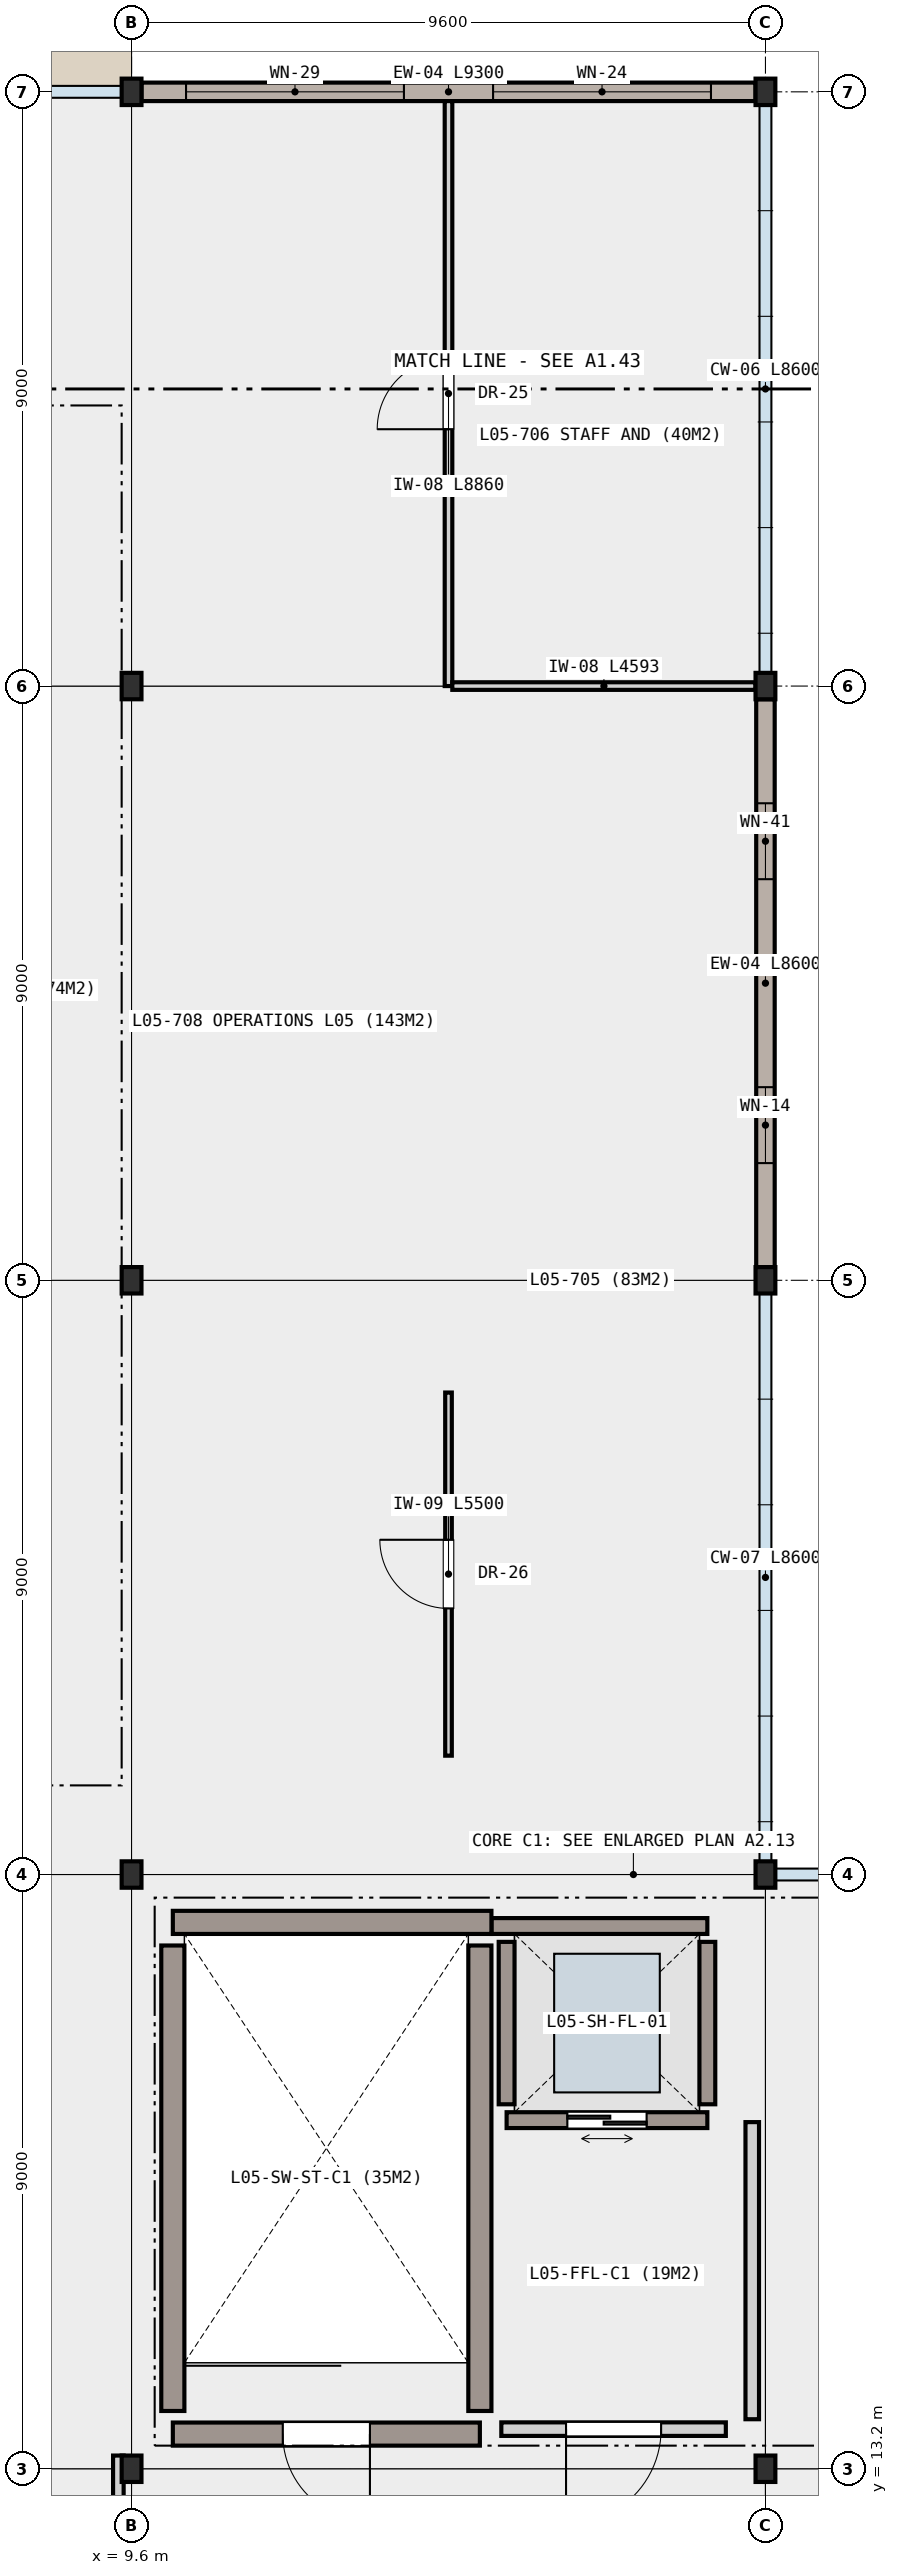
"""IFC4 building model, lengths in metres.
Left out: names, types, materials, properties, quantities, classifications, styles, units other than length and angle.
Written with IfcOpenShell. Run it as: python <this file> out.ifc"""

import sys

from ifc_helpers import new_model, si_unit, direction, frame, frame_2d, origin, origin_2d, place, context, subcontext, project, spatial, rectangle, i_section, extrude, element, fill, save


model = new_model("IFC4")
c1 = context("Model", 3, precision=1e-05, world=origin(), true_north=direction((0.0, 1.0)))
c2 = subcontext(c1, "Body", "Model", "MODEL_VIEW")
j1 = project(units=[si_unit("LENGTHUNIT", "METRE"), si_unit("PLANEANGLEUNIT", "RADIAN")], contexts=[c1])
p1 = place(None, origin())
s1 = spatial("IfcSite", under=j1, at=p1, CompositionType="ELEMENT")
p2 = place(p1, origin())
s2 = spatial("IfcBuilding", under=s1, at=p2, CompositionType="ELEMENT")
p3 = place(p2, frame((0.0, 0.0, 22.8)))
s3 = spatial("IfcBuildingStorey", under=s2, at=p3, CompositionType="ELEMENT", Elevation=22.8)
for number, where, z_axis, x_axis in (
    (1, (9.6, 13.2, 0.0), (0.0, 0.0, 1.0), (1.0, 0.0, 0.0)),
    (2, (9.6, 22.2, 0.0), (0.0, 0.0, 1.0), (1.0, 0.0, 0.0)),
    (3, (9.6, 31.2, 0.0), (0.0, 0.0, 1.0), (1.0, 0.0, 0.0)),
    (4, (9.6, 40.2, 0.0), (0.0, 0.0, 1.0), (1.0, 0.0, 0.0)),
    (5, (9.6, 49.2, 0.0), (0.0, 0.0, 1.0), (1.0, 0.0, 0.0)),
    (6, (19.2, 13.2, 0.0), (0.0, 0.0, 1.0), (1.0, 0.0, 0.0)),
    (7, (19.2, 22.2, 0.0), (0.0, 0.0, 1.0), (1.0, 0.0, 0.0)),
    (8, (19.2, 31.2, 0.0), (0.0, 0.0, 1.0), (1.0, 0.0, 0.0)),
    (9, (19.2, 40.2, 0.0), (0.0, 0.0, 1.0), (1.0, 0.0, 0.0)),
    (10, (19.2, 49.2, 0.0), (0.0, 0.0, 1.0), (1.0, 0.0, 0.0)),
):
    element("IfcColumn", number, at=place(p3, frame(where, z_axis=z_axis, x_axis=x_axis)), inside=s3, PredefinedType="COLUMN", context=c2, shape_type="SweptSolid", body=[
        extrude(i_section(OverallWidth=0.3, OverallDepth=0.4, WebThickness=0.013, FlangeThickness=0.024, FilletRadius=0.027, at=origin_2d()), origin(), (0.0, 0.0, 1.0), 4.2),
    ])
p4 = place(p3, frame((9.75, 49.2, 0.0), z_axis=(0.0, 0.0, 1.0), x_axis=(1.0, 0.0, 0.0)))
e11 = element("IfcWall", 11, at=p4, inside=s3, PredefinedType="SOLIDWALL", context=c2, shape_type="SweptSolid", body=[
    extrude(rectangle(XDim=9.3, YDim=0.28, at=frame_2d((4.65, 0.0))), origin(), (0.0, 0.0, 1.0), 3.57),
])
p5 = place(p4, frame((0.675, 0.0, 0.85)))
e12 = element("IfcOpeningElement", 12, at=p5, cuts=e11, PredefinedType="OPENING", context=c2, shape_type="SweptSolid", body=[
    extrude(rectangle(XDim=3.3, YDim=1.85, at=frame_2d((1.65, 0.925))), frame((0.0, 0.15, 0.0), z_axis=(0.0, -1.0, 0.0), x_axis=(1.0, 0.0, 0.0)), (0.0, 0.0, 1.0), 0.3),
])
p6 = place(p4, frame((5.325, 0.0, 0.85)))
e13 = element("IfcOpeningElement", 13, at=p6, cuts=e11, PredefinedType="OPENING", context=c2, shape_type="SweptSolid", body=[
    extrude(rectangle(XDim=3.3, YDim=2.15, at=frame_2d((1.65, 1.075))), frame((0.0, 0.15, 0.0), z_axis=(0.0, -1.0, 0.0), x_axis=(1.0, 0.0, 0.0)), (0.0, 0.0, 1.0), 0.3),
])
p7 = place(p3, frame((19.2, 40.0, 0.0), z_axis=(0.0, 0.0, 1.0), x_axis=(0.0, -1.0, 0.0)))
e14 = element("IfcWall", 14, at=p7, inside=s3, PredefinedType="SOLIDWALL", context=c2, shape_type="SweptSolid", body=[
    extrude(rectangle(XDim=8.6, YDim=0.28, at=frame_2d((4.3, 0.0))), origin(), (0.0, 0.0, 1.0), 3.57),
])
p8 = place(p7, frame((1.575, 0.0, 0.85)))
e15 = element("IfcOpeningElement", 15, at=p8, cuts=e14, PredefinedType="OPENING", context=c2, shape_type="SweptSolid", body=[
    extrude(rectangle(XDim=1.15, YDim=1.5, at=frame_2d((0.575, 0.75))), frame((0.0, 0.15, 0.0), z_axis=(0.0, -1.0, 0.0), x_axis=(1.0, 0.0, 0.0)), (0.0, 0.0, 1.0), 0.3),
])
p9 = place(p7, frame((5.875, 0.0, 0.85)))
e16 = element("IfcOpeningElement", 16, at=p9, cuts=e14, PredefinedType="OPENING", context=c2, shape_type="SweptSolid", body=[
    extrude(rectangle(XDim=1.15, YDim=1.85, at=frame_2d((0.575, 0.925))), frame((0.0, 0.15, 0.0), z_axis=(0.0, -1.0, 0.0), x_axis=(1.0, 0.0, 0.0)), (0.0, 0.0, 1.0), 0.3),
])
p10 = place(p3, frame((18.32, 18.48, 0.0), z_axis=(0.0, 0.0, 1.0), x_axis=(-1.0, 0.0, 0.0)))
e17 = element("IfcWall", 17, at=p10, inside=s3, PredefinedType="SHEAR", context=c2, shape_type="SweptSolid", body=[
    extrude(rectangle(XDim=3.04, YDim=0.24, at=frame_2d((1.52, 0.0))), origin(), (0.0, 0.0, 1.0), 3.99),
])
p11 = place(p10, frame((0.92, 0.0, 0.0)))
e18 = element("IfcOpeningElement", 18, at=p11, cuts=e17, PredefinedType="OPENING", context=c2, shape_type="SweptSolid", body=[
    extrude(rectangle(XDim=1.2, YDim=2.15, at=frame_2d((0.6, 1.075))), frame((0.0, 0.13, 0.0), z_axis=(0.0, -1.0, 0.0), x_axis=(1.0, 0.0, 0.0)), (0.0, 0.0, 1.0), 0.26),
])
p12 = place(p3, frame((15.05, 21.42, 0.0), z_axis=(0.0, 0.0, 1.0), x_axis=(1.0, 0.0, 0.0)))
e19 = element("IfcWall", 19, at=p12, inside=s3, PredefinedType="SHEAR", context=c2, shape_type="SweptSolid", body=[
    extrude(rectangle(XDim=3.27, YDim=0.24, at=frame_2d((1.635, 0.0))), origin(), (0.0, 0.0, 1.0), 3.99),
])
for number, where, z_axis, x_axis in (
    (20, (15.28, 18.72, 0.0), (0.0, 0.0, 1.0), (0.0, 1.0, 0.0)),
    (21, (18.32, 21.18, 0.0), (0.0, 0.0, 1.0), (0.0, -1.0, 0.0)),
):
    element("IfcWall", number, at=place(p3, frame(where, z_axis=z_axis, x_axis=x_axis)), inside=s3, PredefinedType="SHEAR", context=c2, shape_type="SweptSolid", body=[
        extrude(rectangle(XDim=2.46, YDim=0.24, at=frame_2d((1.23, 0.0))), origin(), (0.0, 0.0, 1.0), 3.99),
    ])
p13 = place(p3, frame((14.875, 13.725, 0.0), z_axis=(0.0, 0.0, 1.0), x_axis=(-1.0, 0.0, 0.0)))
e22 = element("IfcWall", 22, at=p13, inside=s3, PredefinedType="SHEAR", context=c2, shape_type="SweptSolid", body=[
    extrude(rectangle(XDim=4.65, YDim=0.35, at=frame_2d((2.325, 0.0))), origin(), (0.0, 0.0, 1.0), 3.99),
])
p14 = place(p13, frame((1.665, 0.0, 0.0)))
e23 = element("IfcOpeningElement", 23, at=p14, cuts=e22, PredefinedType="OPENING", context=c2, shape_type="SweptSolid", body=[
    extrude(rectangle(XDim=1.32, YDim=2.15, at=frame_2d((0.66, 1.075))), frame((0.0, 0.185, 0.0), z_axis=(0.0, -1.0, 0.0), x_axis=(1.0, 0.0, 0.0)), (0.0, 0.0, 1.0), 0.37),
])
p15 = place(p3, frame((10.225, 21.475, 0.0), z_axis=(0.0, 0.0, 1.0), x_axis=(1.0, 0.0, 0.0)))
e24 = element("IfcWall", 24, at=p15, inside=s3, PredefinedType="SHEAR", context=c2, shape_type="SweptSolid", body=[
    extrude(rectangle(XDim=4.825, YDim=0.35, at=frame_2d((2.413, 0.0))), origin(), (0.0, 0.0, 1.0), 3.99),
])
for number, where, z_axis, x_axis in (
    (25, (10.225, 14.075, 0.0), (0.0, 0.0, 1.0), (0.0, 1.0, 0.0)),
    (26, (14.875, 21.125, 0.0), (0.0, 0.0, 1.0), (0.0, -1.0, 0.0)),
):
    element("IfcWall", number, at=place(p3, frame(where, z_axis=z_axis, x_axis=x_axis)), inside=s3, PredefinedType="SHEAR", context=c2, shape_type="SweptSolid", body=[
        extrude(rectangle(XDim=7.05, YDim=0.35, at=frame_2d((3.525, 0.0))), origin(), (0.0, 0.0, 1.0), 3.99),
    ])
p16 = place(p3, frame((18.6, 13.8, 0.0), z_axis=(0.0, 0.0, 1.0), x_axis=(-1.0, 0.0, 0.0)))
e27 = element("IfcWall", 27, at=p16, inside=s3, PredefinedType="PARTITIONING", context=c2, shape_type="SweptSolid", body=[
    extrude(rectangle(XDim=3.4, YDim=0.205, at=frame_2d((1.7, 0.0))), origin(), (0.0, 0.0, 1.0), 3.99),
])
p17 = place(p16, frame((0.98, 0.0, 0.0)))
e28 = element("IfcOpeningElement", 28, at=p17, cuts=e27, PredefinedType="OPENING", context=c2, shape_type="SweptSolid", body=[
    extrude(rectangle(XDim=1.44, YDim=2.18, at=frame_2d((0.72, 1.09))), frame((0.0, 0.113, 0.0), z_axis=(0.0, -1.0, 0.0), x_axis=(1.0, 0.0, 0.0)), (0.0, 0.0, 1.0), 0.225),
])
p18 = place(p3, frame((19.0, 18.45, 0.0), z_axis=(0.0, 0.0, 1.0), x_axis=(0.0, -1.0, 0.0)))
e29 = element("IfcWall", 29, at=p18, inside=s3, PredefinedType="PARTITIONING", context=c2, shape_type="SweptSolid", body=[
    extrude(rectangle(XDim=4.5, YDim=0.205, at=frame_2d((2.25, 0.0))), origin(), (0.0, 0.0, 1.0), 3.57),
])
p19 = place(p3, frame((9.4, 13.4, 0.0), z_axis=(0.0, 0.0, 1.0), x_axis=(0.0, -1.0, 0.0)))
e30 = element("IfcWall", 30, at=p19, inside=s3, PredefinedType="PARTITIONING", context=c2, shape_type="SweptSolid", body=[
    extrude(rectangle(XDim=3.4, YDim=0.16, at=frame_2d((1.7, 0.0))), origin(), (0.0, 0.0, 1.0), 3.57),
])
p20 = place(p19, frame((1.13, 0.0, 0.0)))
e31 = element("IfcOpeningElement", 31, at=p20, cuts=e30, PredefinedType="OPENING", context=c2, shape_type="SweptSolid", body=[
    extrude(rectangle(XDim=1.14, YDim=2.16, at=frame_2d((0.57, 1.08))), frame((0.0, 0.09, 0.0), z_axis=(0.0, -1.0, 0.0), x_axis=(1.0, 0.0, 0.0)), (0.0, 0.0, 1.0), 0.18),
])
p21 = place(p3, frame((14.4, 24.0, 0.0), z_axis=(0.0, 0.0, 1.0), x_axis=(0.0, 1.0, 0.0)))
e32 = element("IfcWall", 32, at=p21, inside=s3, PredefinedType="PARTITIONING", context=c2, shape_type="SweptSolid", body=[
    extrude(rectangle(XDim=5.5, YDim=0.1, at=frame_2d((2.75, 0.0))), origin(), (0.0, 0.0, 1.0), 3.99),
])
p22 = place(p21, frame((2.23, 0.0, 0.0)))
e33 = element("IfcOpeningElement", 33, at=p22, cuts=e32, PredefinedType="OPENING", context=c2, shape_type="SweptSolid", body=[
    extrude(rectangle(XDim=1.04, YDim=2.12, at=frame_2d((0.52, 1.06))), frame((0.0, 0.06, 0.0), z_axis=(0.0, -1.0, 0.0), x_axis=(1.0, 0.0, 0.0)), (0.0, 0.0, 1.0), 0.12),
])
p23 = place(p3, frame((14.4, 40.2, 0.0), z_axis=(0.0, 0.0, 1.0), x_axis=(0.0, 1.0, 0.0)))
e34 = element("IfcWall", 34, at=p23, inside=s3, PredefinedType="PARTITIONING", context=c2, shape_type="SweptSolid", body=[
    extrude(rectangle(XDim=8.86, YDim=0.115, at=frame_2d((4.43, 0.0))), origin(), (0.0, 0.0, 1.0), 3.99),
])
p24 = place(p23, frame((3.89, 0.0, 0.0)))
e35 = element("IfcOpeningElement", 35, at=p24, cuts=e34, PredefinedType="OPENING", context=c2, shape_type="SweptSolid", body=[
    extrude(rectangle(XDim=1.08, YDim=2.12, at=frame_2d((0.54, 1.06))), frame((0.0, 0.067, 0.0), z_axis=(0.0, -1.0, 0.0), x_axis=(1.0, 0.0, 0.0)), (0.0, 0.0, 1.0), 0.135),
])
p25 = place(p3, frame((19.05, 40.2, 0.0), z_axis=(0.0, 0.0, 1.0), x_axis=(-1.0, 0.0, 0.0)))
e36 = element("IfcWall", 36, at=p25, inside=s3, PredefinedType="PARTITIONING", context=c2, shape_type="SweptSolid", body=[
    extrude(rectangle(XDim=4.593, YDim=0.115, at=frame_2d((2.296, 0.0))), origin(), (0.0, 0.0, 1.0), 3.57),
])
p26 = place(p5, origin())
e37 = element("IfcWindow", 37, at=p26, inside=s3, PartitioningType="SINGLE_PANEL", PredefinedType="WINDOW", context=c2, shape_type="SweptSolid", body=[
    extrude(rectangle(XDim=3.3, YDim=1.85, at=frame_2d((1.65, 0.925))), frame((0.0, 0.03, 0.0), z_axis=(0.0, -1.0, 0.0), x_axis=(1.0, 0.0, 0.0)), (0.0, 0.0, 1.0), 0.06),
])
fill(e12, e37)
p27 = place(p6, origin())
e38 = element("IfcWindow", 38, at=p27, inside=s3, PartitioningType="SINGLE_PANEL", PredefinedType="WINDOW", context=c2, shape_type="SweptSolid", body=[
    extrude(rectangle(XDim=3.3, YDim=2.15, at=frame_2d((1.65, 1.075))), frame((0.0, 0.03, 0.0), z_axis=(0.0, -1.0, 0.0), x_axis=(1.0, 0.0, 0.0)), (0.0, 0.0, 1.0), 0.06),
])
fill(e13, e38)
p28 = place(p8, origin())
e39 = element("IfcWindow", 39, at=p28, inside=s3, PartitioningType="SINGLE_PANEL", PredefinedType="WINDOW", context=c2, shape_type="SweptSolid", body=[
    extrude(rectangle(XDim=1.15, YDim=1.5, at=frame_2d((0.575, 0.75))), frame((0.0, 0.03, 0.0), z_axis=(0.0, -1.0, 0.0), x_axis=(1.0, 0.0, 0.0)), (0.0, 0.0, 1.0), 0.06),
])
fill(e15, e39)
p29 = place(p9, origin())
e40 = element("IfcWindow", 40, at=p29, inside=s3, PartitioningType="SINGLE_PANEL", PredefinedType="WINDOW", context=c2, shape_type="SweptSolid", body=[
    extrude(rectangle(XDim=1.15, YDim=1.85, at=frame_2d((0.575, 0.925))), frame((0.0, 0.03, 0.0), z_axis=(0.0, -1.0, 0.0), x_axis=(1.0, 0.0, 0.0)), (0.0, 0.0, 1.0), 0.06),
])
fill(e16, e40)
p30 = place(p11, origin())
e41 = element("IfcDoor", 41, at=p30, inside=s3, OperationType="DOUBLE_DOOR_SLIDING", PredefinedType="DOOR", context=c2, shape_type="SweptSolid", body=[
    extrude(rectangle(XDim=1.2, YDim=2.15, at=frame_2d((0.6, 1.075))), frame((0.0, 0.025, 0.0), z_axis=(0.0, -1.0, 0.0), x_axis=(1.0, 0.0, 0.0)), (0.0, 0.0, 1.0), 0.05),
])
fill(e18, e41)
p31 = place(p14, origin())
e42 = element("IfcDoor", 42, at=p31, inside=s3, OperationType="SINGLE_SWING_LEFT", PredefinedType="DOOR", context=c2, shape_type="SweptSolid", body=[
    extrude(rectangle(XDim=1.32, YDim=2.15, at=frame_2d((0.66, 1.075))), frame((0.0, 0.025, 0.0), z_axis=(0.0, -1.0, 0.0), x_axis=(1.0, 0.0, 0.0)), (0.0, 0.0, 1.0), 0.05),
])
fill(e23, e42)
p32 = place(p17, origin())
e43 = element("IfcDoor", 43, at=p32, inside=s3, OperationType="SINGLE_SWING_RIGHT", PredefinedType="DOOR", context=c2, shape_type="SweptSolid", body=[
    extrude(rectangle(XDim=1.44, YDim=2.18, at=frame_2d((0.72, 1.09))), frame((0.0, 0.025, 0.0), z_axis=(0.0, -1.0, 0.0), x_axis=(1.0, 0.0, 0.0)), (0.0, 0.0, 1.0), 0.05),
])
fill(e28, e43)
p33 = place(p22, origin())
e44 = element("IfcDoor", 44, at=p33, inside=s3, OperationType="SINGLE_SWING_RIGHT", PredefinedType="DOOR", context=c2, shape_type="SweptSolid", body=[
    extrude(rectangle(XDim=1.04, YDim=2.12, at=frame_2d((0.52, 1.06))), frame((0.0, 0.025, 0.0), z_axis=(0.0, -1.0, 0.0), x_axis=(1.0, 0.0, 0.0)), (0.0, 0.0, 1.0), 0.05),
])
fill(e33, e44)
p34 = place(p24, origin())
e45 = element("IfcDoor", 45, at=p34, inside=s3, OperationType="SINGLE_SWING_LEFT", PredefinedType="DOOR", context=c2, shape_type="SweptSolid", body=[
    extrude(rectangle(XDim=1.08, YDim=2.12, at=frame_2d((0.54, 1.06))), frame((0.0, 0.025, 0.0), z_axis=(0.0, -1.0, 0.0), x_axis=(1.0, 0.0, 0.0)), (0.0, 0.0, 1.0), 0.05),
])
fill(e35, e45)
save(model, sys.argv[1])
